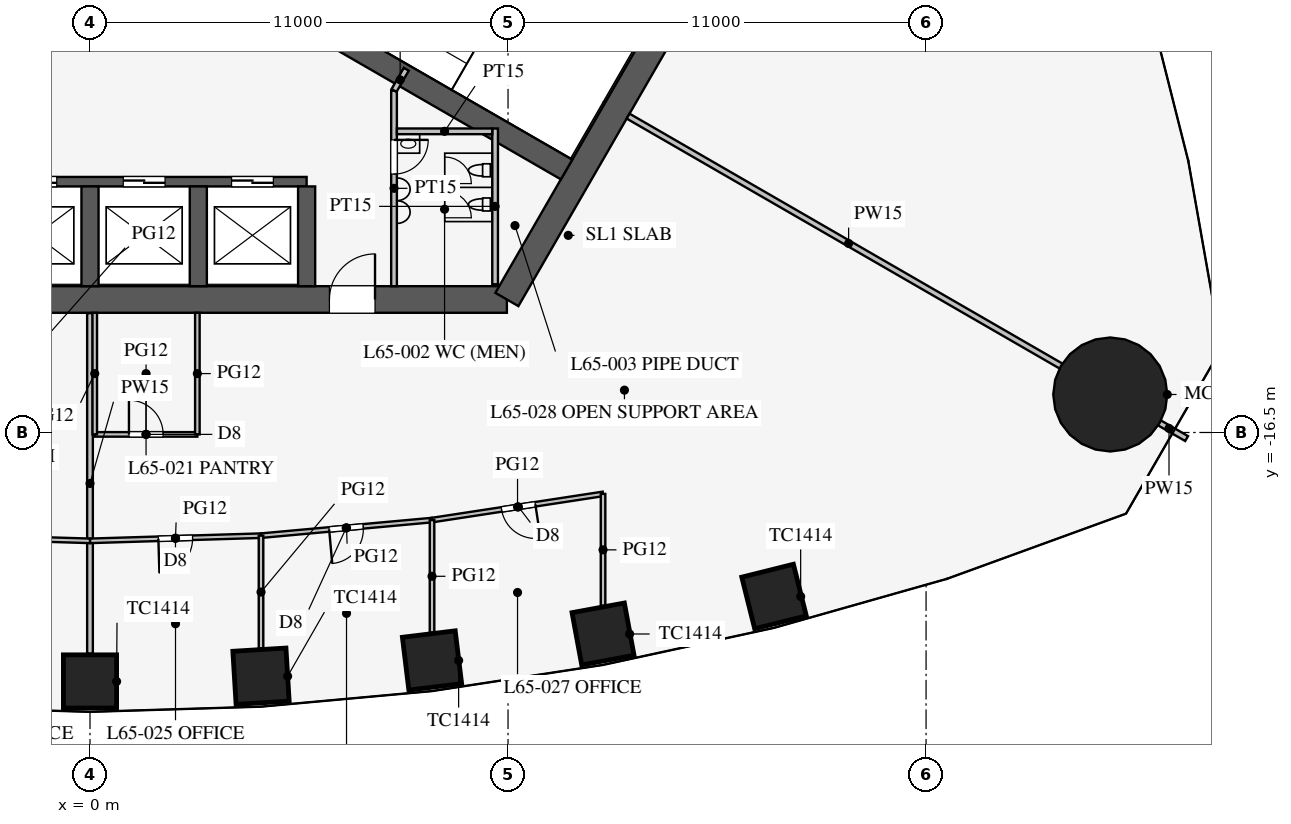
"""IFC4 building model, lengths in metres.
Left out: names, types, materials, properties, quantities, classifications, styles, units other than length and angle.
Written with IfcOpenShell. Run it as: python <this file> out.ifc"""

import sys

from ifc_helpers import new_model, si_unit, direction, frame, frame_2d, origin, origin_2d, place, context, subcontext, project, spatial, rectangle, circle, extrude, element, fill, save


model = new_model("IFC4")
c1 = context("Model", 3, precision=1e-05, world=origin(), true_north=direction((0.0, 1.0)))
c2 = subcontext(c1, "Body", "Model", "MODEL_VIEW")
j1 = project(units=[si_unit("LENGTHUNIT", "METRE"), si_unit("PLANEANGLEUNIT", "RADIAN")], contexts=[c1])
p1 = place(None, origin())
s1 = spatial("IfcSite", under=j1, at=p1, CompositionType="ELEMENT")
p2 = place(p1, origin())
s2 = spatial("IfcBuilding", under=s1, at=p2, CompositionType="ELEMENT")
p3 = place(p2, frame((0.0, 0.0, 284.7)))
s3 = spatial("IfcBuildingStorey", under=s2, at=p3, CompositionType="ELEMENT", Elevation=284.7)
for number, where, z_axis, x_axis in (
    (1, (0.0, -23.052, 0.0), (0.0, 0.0, 1.0), (1.0, 0.0, 0.0)),
    (2, (4.5, -22.914, 0.0), (0.0, 0.0, 1.0), (0.998, 0.061, 0.0)),
    (3, (9.0, -22.499, 0.0), (0.0, 0.0, 1.0), (0.993, 0.121, 0.0)),
    (4, (13.5, -21.803, 0.0), (0.0, 0.0, 1.0), (0.983, 0.182, 0.0)),
    (5, (18.0, -20.816, 0.0), (0.0, 0.0, 1.0), (0.97, 0.242, 0.0)),
):
    element("IfcColumn", number, at=place(p3, frame(where, z_axis=z_axis, x_axis=x_axis)), inside=s3, PredefinedType="COLUMN", context=c2, shape_type="SweptSolid", body=[
        extrude(rectangle(XDim=1.4, YDim=1.4, at=origin_2d()), origin(), (0.0, 0.0, 1.0), 4.2),
    ])
p4 = place(p3, frame((26.847, -15.5, 0.0), z_axis=(0.0, 0.0, 1.0), x_axis=(1.0, 0.0, 0.0)))
e6 = element("IfcColumn", 6, at=p4, inside=s3, PredefinedType="COLUMN", context=c2, shape_type="SweptSolid", body=[
    extrude(circle(Radius=1.5, at=origin_2d()), origin(), (0.0, 0.0, 1.0), 4.2),
])
p5 = place(p3, frame((-10.97, -13.0, 0.0), z_axis=(0.0, 0.0, 1.0), x_axis=(1.0, 0.0, 0.0)))
e7 = element("IfcWall", 7, at=p5, inside=s3, PredefinedType="SHEAR", context=c2, shape_type="SweptSolid", body=[
    extrude(rectangle(XDim=21.939, YDim=0.7, at=frame_2d((10.97, 0.0))), origin(), (0.0, 0.0, 1.0), 4.2),
])
p6 = place(p5, frame((17.27, 0.0, 0.0)))
e8 = element("IfcOpeningElement", 8, at=p6, cuts=e7, PredefinedType="OPENING", context=c2, shape_type="SweptSolid", body=[
    extrude(rectangle(XDim=1.2, YDim=2.1, at=frame_2d((0.6, 1.05))), frame((0.0, 0.36, 0.0), z_axis=(0.0, -1.0, 0.0), x_axis=(1.0, 0.0, 0.0)), (0.0, 0.0, 1.0), 0.72),
])
p7 = place(p5, frame((3.47, 0.0, 0.0)))
e9 = element("IfcOpeningElement", 9, at=p7, cuts=e7, PredefinedType="OPENING", context=c2, shape_type="SweptSolid", body=[
    extrude(rectangle(XDim=1.2, YDim=2.1, at=frame_2d((0.6, 1.05))), frame((0.0, 0.36, 0.0), z_axis=(0.0, -1.0, 0.0), x_axis=(1.0, 0.0, 0.0)), (0.0, 0.0, 1.0), 0.72),
])
p8 = place(p3, frame((10.97, -13.0, 0.0), z_axis=(0.0, 0.0, 1.0), x_axis=(0.499995765644, 0.866027848477, 0.0)))
e10 = element("IfcWall", 10, at=p8, inside=s3, PredefinedType="SHEAR", context=c2, shape_type="SweptSolid", body=[
    extrude(rectangle(XDim=11.547, YDim=0.7, at=frame_2d((5.773, 0.0))), origin(), (0.0, 0.0, 1.0), 4.2),
])
p9 = place(p3, frame((-5.7, -9.9, 0.0), z_axis=(0.0, 0.0, 1.0), x_axis=(1.0, 0.0, 0.0)))
e11 = element("IfcWall", 11, at=p9, inside=s3, PredefinedType="SHEAR", context=c2, shape_type="SweptSolid", body=[
    extrude(rectangle(XDim=11.4, YDim=0.25, at=frame_2d((5.7, 0.0))), origin(), (0.0, 0.0, 1.0), 4.2),
])
p10 = place(p9, frame((0.875, 0.0, 0.0)))
e12 = element("IfcOpeningElement", 12, at=p10, cuts=e11, PredefinedType="OPENING", context=c2, shape_type="SweptSolid", body=[
    extrude(rectangle(XDim=1.1, YDim=2.2, at=frame_2d((0.55, 1.1))), frame((0.0, 0.135, 0.0), z_axis=(0.0, -1.0, 0.0), x_axis=(1.0, 0.0, 0.0)), (0.0, 0.0, 1.0), 0.27),
])
p11 = place(p9, frame((3.725, 0.0, 0.0)))
e13 = element("IfcOpeningElement", 13, at=p11, cuts=e11, PredefinedType="OPENING", context=c2, shape_type="SweptSolid", body=[
    extrude(rectangle(XDim=1.1, YDim=2.2, at=frame_2d((0.55, 1.1))), frame((0.0, 0.135, 0.0), z_axis=(0.0, -1.0, 0.0), x_axis=(1.0, 0.0, 0.0)), (0.0, 0.0, 1.0), 0.27),
])
p12 = place(p9, frame((6.575, 0.0, 0.0)))
e14 = element("IfcOpeningElement", 14, at=p12, cuts=e11, PredefinedType="OPENING", context=c2, shape_type="SweptSolid", body=[
    extrude(rectangle(XDim=1.1, YDim=2.2, at=frame_2d((0.55, 1.1))), frame((0.0, 0.135, 0.0), z_axis=(0.0, -1.0, 0.0), x_axis=(1.0, 0.0, 0.0)), (0.0, 0.0, 1.0), 0.27),
])
p13 = place(p9, frame((9.425, 0.0, 0.0)))
e15 = element("IfcOpeningElement", 15, at=p13, cuts=e11, PredefinedType="OPENING", context=c2, shape_type="SweptSolid", body=[
    extrude(rectangle(XDim=1.1, YDim=2.2, at=frame_2d((0.55, 1.1))), frame((0.0, 0.135, 0.0), z_axis=(0.0, -1.0, 0.0), x_axis=(1.0, 0.0, 0.0)), (0.0, 0.0, 1.0), 0.27),
])
for number, where, z_axis, x_axis in (
    (16, (0.0, -10.025, 0.0), (0.0, 0.0, 1.0), (0.0, -1.0, 0.0)),
    (17, (2.85, -10.025, 0.0), (0.0, 0.0, 1.0), (0.0, -1.0, 0.0)),
    (18, (5.7, -10.025, 0.0), (0.0, 0.0, 1.0), (0.0, -1.0, 0.0)),
):
    element("IfcWall", number, at=place(p3, frame(where, z_axis=z_axis, x_axis=x_axis)), inside=s3, PredefinedType="SHEAR", context=c2, shape_type="SweptSolid", body=[
        extrude(rectangle(XDim=2.625, YDim=0.45, at=frame_2d((1.312, 0.0))), origin(), (0.0, 0.0, 1.0), 4.2),
    ])
p14 = place(p3, frame((4.638, -5.016, 0.0), z_axis=(0.0, 0.0, 1.0), x_axis=(0.866021621257, -0.500006551472, 0.0)))
e19 = element("IfcWall", 19, at=p14, inside=s3, PredefinedType="SHEAR", context=c2, shape_type="SweptSolid", body=[
    extrude(rectangle(XDim=9.125, YDim=0.6, at=frame_2d((4.562, 0.0))), origin(), (0.0, 0.0, 1.0), 4.2),
])
p15 = place(p3, frame((8.0, -7.5, 0.0), z_axis=(0.0, 0.0, 1.0), x_axis=(0.0, -1.0, 0.0)))
e20 = element("IfcWall", 20, at=p15, inside=s3, PredefinedType="PARTITIONING", context=c2, shape_type="SweptSolid", body=[
    extrude(rectangle(XDim=5.15, YDim=0.15, at=frame_2d((2.575, 0.0))), origin(), (0.0, 0.0, 1.0), 4.0),
])
p16 = place(p15, frame((1.3, 0.0, 0.0)))
e21 = element("IfcOpeningElement", 21, at=p16, cuts=e20, PredefinedType="OPENING", context=c2, shape_type="SweptSolid", body=[
    extrude(rectangle(XDim=0.9, YDim=2.1, at=frame_2d((0.45, 1.05))), frame((0.0, 0.085, 0.0), z_axis=(0.0, -1.0, 0.0), x_axis=(1.0, 0.0, 0.0)), (0.0, 0.0, 1.0), 0.17),
])
p17 = place(p3, frame((8.0, -7.5, 0.0), z_axis=(0.0, 0.0, 1.0), x_axis=(0.499842556608, 0.866116284689, 0.0)))
e22 = element("IfcWall", 22, at=p17, inside=s3, PredefinedType="PARTITIONING", context=c2, shape_type="SweptSolid", body=[
    extrude(rectangle(XDim=0.645, YDim=0.15, at=frame_2d((0.323, 0.0))), origin(), (0.0, 0.0, 1.0), 4.0),
])
p18 = place(p3, frame((10.66, -8.5, 0.0), z_axis=(0.0, 0.0, 1.0), x_axis=(0.0, -1.0, 0.0)))
e23 = element("IfcWall", 23, at=p18, inside=s3, PredefinedType="PARTITIONING", context=c2, shape_type="SweptSolid", body=[
    extrude(rectangle(XDim=4.1, YDim=0.15, at=frame_2d((2.05, 0.0))), origin(), (0.0, 0.0, 1.0), 4.0),
])
p19 = place(p3, frame((8.075, -8.575, 0.0), z_axis=(0.0, 0.0, 1.0), x_axis=(1.0, 0.0, 0.0)))
e24 = element("IfcWall", 24, at=p19, inside=s3, PredefinedType="PARTITIONING", context=c2, shape_type="SweptSolid", body=[
    extrude(rectangle(XDim=2.51, YDim=0.15, at=frame_2d((1.255, 0.0))), origin(), (0.0, 0.0, 1.0), 4.0),
])
p20 = place(p3, frame((14.159, -8.175, 0.0), z_axis=(0.0, 0.0, 1.0), x_axis=(0.866026905467, -0.499997399001, 0.0)))
e25 = element("IfcWall", 25, at=p20, inside=s3, PredefinedType="PARTITIONING", context=c2, shape_type="SweptSolid", body=[
    extrude(rectangle(XDim=13.4, YDim=0.15, at=frame_2d((6.7, 0.0))), origin(), (0.0, 0.0, 1.0), 2.5),
])
p21 = place(p3, frame((27.929, -16.125, 0.0), z_axis=(0.0, 0.0, 1.0), x_axis=(0.866086810508, -0.499893625349, 0.0)))
e26 = element("IfcWall", 26, at=p21, inside=s3, PredefinedType="PARTITIONING", context=c2, shape_type="SweptSolid", body=[
    extrude(rectangle(XDim=1.07, YDim=0.15, at=frame_2d((0.535, 0.0))), origin(), (0.0, 0.0, 1.0), 2.5),
])
p22 = place(p3, frame((0.0, -13.36, 0.0), z_axis=(0.0, 0.0, 1.0), x_axis=(0.0, -1.0, 0.0)))
e27 = element("IfcWall", 27, at=p22, inside=s3, PredefinedType="PARTITIONING", context=c2, shape_type="SweptSolid", body=[
    extrude(rectangle(XDim=8.961, YDim=0.15, at=frame_2d((4.481, 0.0))), origin(), (0.0, 0.0, 1.0), 3.0),
])
p23 = place(p3, frame((0.125, -16.55, 0.0), z_axis=(0.0, 0.0, 1.0), x_axis=(1.0, 0.0, 0.0)))
e28 = element("IfcWall", 28, at=p23, inside=s3, PredefinedType="PARTITIONING", context=c2, shape_type="SweptSolid", body=[
    extrude(rectangle(XDim=2.7, YDim=0.12, at=frame_2d((1.35, 0.0))), origin(), (0.0, 0.0, 1.0), 2.9),
])
p24 = place(p23, frame((0.9, 0.0, 0.15)))
e29 = element("IfcOpeningElement", 29, at=p24, cuts=e28, PredefinedType="OPENING", context=c2, shape_type="SweptSolid", body=[
    extrude(rectangle(XDim=0.9, YDim=2.1, at=frame_2d((0.45, 1.05))), frame((0.0, 0.07, 0.0), z_axis=(0.0, -1.0, 0.0), x_axis=(1.0, 0.0, 0.0)), (0.0, 0.0, 1.0), 0.14),
])
for number, where, z_axis, x_axis in (
    (30, (0.125, -13.35, 0.0), (0.0, 0.0, 1.0), (0.0, -1.0, 0.0)),
    (31, (2.825, -13.35, 0.0), (0.0, 0.0, 1.0), (0.0, -1.0, 0.0)),
):
    element("IfcWall", number, at=place(p3, frame(where, z_axis=z_axis, x_axis=x_axis)), inside=s3, PredefinedType="PARTITIONING", context=c2, shape_type="SweptSolid", body=[
        extrude(rectangle(XDim=3.2, YDim=0.12, at=frame_2d((1.6, 0.0))), origin(), (0.0, 0.0, 1.0), 2.9),
    ])
p25 = place(p3, frame((0.0, -19.352, 0.0), z_axis=(0.0, 0.0, 1.0), x_axis=(0.999542074227, 0.030259574513, 0.0)))
e32 = element("IfcWall", 32, at=p25, inside=s3, PredefinedType="PARTITIONING", context=c2, shape_type="SweptSolid", body=[
    extrude(rectangle(XDim=4.502, YDim=0.12, at=frame_2d((2.251, 0.0))), origin(), (0.0, 0.0, 1.0), 2.9),
])
p26 = place(p25, frame((1.8, 0.0, 0.15)))
e33 = element("IfcOpeningElement", 33, at=p26, cuts=e32, PredefinedType="OPENING", context=c2, shape_type="SweptSolid", body=[
    extrude(rectangle(XDim=0.9, YDim=2.1, at=frame_2d((0.45, 1.05))), frame((0.0, 0.07, 0.0), z_axis=(0.0, -1.0, 0.0), x_axis=(1.0, 0.0, 0.0)), (0.0, 0.0, 1.0), 0.14),
])
p27 = place(p3, frame((4.5, -19.215, 0.0), z_axis=(0.0, 0.0, 1.0), x_axis=(0.995871921504, 0.090769576179, 0.0)))
e34 = element("IfcWall", 34, at=p27, inside=s3, PredefinedType="PARTITIONING", context=c2, shape_type="SweptSolid", body=[
    extrude(rectangle(XDim=4.519, YDim=0.12, at=frame_2d((2.259, 0.0))), origin(), (0.0, 0.0, 1.0), 2.9),
])
p28 = place(p27, frame((1.8, 0.0, 0.15)))
e35 = element("IfcOpeningElement", 35, at=p28, cuts=e34, PredefinedType="OPENING", context=c2, shape_type="SweptSolid", body=[
    extrude(rectangle(XDim=0.9, YDim=2.1, at=frame_2d((0.45, 1.05))), frame((0.0, 0.07, 0.0), z_axis=(0.0, -1.0, 0.0), x_axis=(1.0, 0.0, 0.0)), (0.0, 0.0, 1.0), 0.14),
])
p29 = place(p3, frame((9.0, -18.805, 0.0), z_axis=(0.0, 0.0, 1.0), x_axis=(0.988481794406, 0.151339823341, 0.0)))
e36 = element("IfcWall", 36, at=p29, inside=s3, PredefinedType="PARTITIONING", context=c2, shape_type="SweptSolid", body=[
    extrude(rectangle(XDim=4.552, YDim=0.12, at=frame_2d((2.276, 0.0))), origin(), (0.0, 0.0, 1.0), 2.9),
])
p30 = place(p29, frame((1.85, 0.0, 0.15)))
e37 = element("IfcOpeningElement", 37, at=p30, cuts=e36, PredefinedType="OPENING", context=c2, shape_type="SweptSolid", body=[
    extrude(rectangle(XDim=0.9, YDim=2.1, at=frame_2d((0.45, 1.05))), frame((0.0, 0.07, 0.0), z_axis=(0.0, -1.0, 0.0), x_axis=(1.0, 0.0, 0.0)), (0.0, 0.0, 1.0), 0.14),
])
p31 = place(p3, frame((-4.5, -19.215, 0.0), z_axis=(0.0, 0.0, 1.0), x_axis=(0.999542074227, -0.030259574513, 0.0)))
e38 = element("IfcWall", 38, at=p31, inside=s3, PredefinedType="PARTITIONING", context=c2, shape_type="SweptSolid", body=[
    extrude(rectangle(XDim=4.502, YDim=0.12, at=frame_2d((2.251, 0.0))), origin(), (0.0, 0.0, 1.0), 2.9),
])
p32 = place(p31, frame((1.8, 0.0, 0.15)))
e39 = element("IfcOpeningElement", 39, at=p32, cuts=e38, PredefinedType="OPENING", context=c2, shape_type="SweptSolid", body=[
    extrude(rectangle(XDim=0.9, YDim=2.1, at=frame_2d((0.45, 1.05))), frame((0.0, 0.07, 0.0), z_axis=(0.0, -1.0, 0.0), x_axis=(1.0, 0.0, 0.0)), (0.0, 0.0, 1.0), 0.14),
])
p33 = place(p3, frame((13.5, -18.116, 0.0), z_axis=(0.0, 0.0, 1.0), x_axis=(0.0, -1.0, 0.0)))
e40 = element("IfcWall", 40, at=p33, inside=s3, PredefinedType="PARTITIONING", context=c2, shape_type="SweptSolid", body=[
    extrude(rectangle(XDim=2.944, YDim=0.12, at=frame_2d((1.472, 0.0))), origin(), (0.0, 0.0, 1.0), 2.8),
])
p34 = place(p3, frame((4.5, -19.215, 0.0), z_axis=(0.0, 0.0, 1.0), x_axis=(0.0, -1.0, 0.0)))
e41 = element("IfcWall", 41, at=p34, inside=s3, PredefinedType="PARTITIONING", context=c2, shape_type="SweptSolid", body=[
    extrude(rectangle(XDim=2.967, YDim=0.12, at=frame_2d((1.484, 0.0))), origin(), (0.0, 0.0, 1.0), 2.9),
])
p35 = place(p3, frame((9.0, -18.805, 0.0), z_axis=(0.0, 0.0, 1.0), x_axis=(0.0, -1.0, 0.0)))
e42 = element("IfcWall", 42, at=p35, inside=s3, PredefinedType="PARTITIONING", context=c2, shape_type="SweptSolid", body=[
    extrude(rectangle(XDim=2.959, YDim=0.12, at=frame_2d((1.479, 0.0))), origin(), (0.0, 0.0, 1.0), 2.9),
])
p36 = place(p3, frame((-0.49, 29.571, 0.0), z_axis=(0.0, 0.0, 1.0), x_axis=(-0.499999496503, -0.866025694478, 0.0)))
e43 = element("IfcWall", 43, at=p36, inside=s3, PredefinedType="PARTITIONING", context=c2, shape_type="SweptSolid", body=[
    extrude(rectangle(XDim=50.728, YDim=0.12, at=frame_2d((25.364, 0.0))), origin(), (0.0, 0.0, 1.0), 2.9),
])
p37 = place(p36, frame((9.8, 0.0, 0.15)))
e44 = element("IfcOpeningElement", 44, at=p37, cuts=e43, PredefinedType="OPENING", context=c2, shape_type="SweptSolid", body=[
    extrude(rectangle(XDim=1.8, YDim=2.1, at=frame_2d((0.9, 1.05))), frame((0.0, 0.07, 0.0), z_axis=(0.0, -1.0, 0.0), x_axis=(1.0, 0.0, 0.0)), (0.0, 0.0, 1.0), 0.14),
])
p38 = place(p36, frame((39.15, 0.0, 0.15)))
e45 = element("IfcOpeningElement", 45, at=p38, cuts=e43, PredefinedType="OPENING", context=c2, shape_type="SweptSolid", body=[
    extrude(rectangle(XDim=1.8, YDim=2.1, at=frame_2d((0.9, 1.05))), frame((0.0, 0.07, 0.0), z_axis=(0.0, -1.0, 0.0), x_axis=(1.0, 0.0, 0.0)), (0.0, 0.0, 1.0), 0.14),
])
p39 = place(p16, origin())
e46 = element("IfcDoor", 46, at=p39, inside=s3, OperationType="SINGLE_SWING_LEFT", PredefinedType="DOOR", context=c2, shape_type="SweptSolid", body=[
    extrude(rectangle(XDim=0.9, YDim=2.1, at=frame_2d((0.45, 1.05))), frame((0.0, 0.025, 0.0), z_axis=(0.0, -1.0, 0.0), x_axis=(1.0, 0.0, 0.0)), (0.0, 0.0, 1.0), 0.05),
])
fill(e21, e46)
p40 = place(p6, origin())
e47 = element("IfcDoor", 47, at=p40, inside=s3, OperationType="SINGLE_SWING_RIGHT", PredefinedType="DOOR", context=c2, shape_type="SweptSolid", body=[
    extrude(rectangle(XDim=1.2, YDim=2.1, at=frame_2d((0.6, 1.05))), frame((0.0, 0.025, 0.0), z_axis=(0.0, -1.0, 0.0), x_axis=(1.0, 0.0, 0.0)), (0.0, 0.0, 1.0), 0.05),
])
fill(e8, e47)
p41 = place(p24, origin())
e48 = element("IfcDoor", 48, at=p41, inside=s3, OperationType="SINGLE_SWING_LEFT", PredefinedType="DOOR", context=c2, shape_type="SweptSolid", body=[
    extrude(rectangle(XDim=0.9, YDim=2.1, at=frame_2d((0.45, 1.05))), frame((0.0, 0.025, 0.0), z_axis=(0.0, -1.0, 0.0), x_axis=(1.0, 0.0, 0.0)), (0.0, 0.0, 1.0), 0.05),
])
fill(e29, e48)
p42 = place(p26, frame((0.9, 0.0, 0.0), z_axis=(0.0, 0.0, 1.0), x_axis=(-1.0, 0.0, 0.0)))
e49 = element("IfcDoor", 49, at=p42, inside=s3, OperationType="SINGLE_SWING_RIGHT", PredefinedType="DOOR", context=c2, shape_type="SweptSolid", body=[
    extrude(rectangle(XDim=0.9, YDim=2.1, at=frame_2d((0.45, 1.05))), frame((0.0, 0.025, 0.0), z_axis=(0.0, -1.0, 0.0), x_axis=(1.0, 0.0, 0.0)), (0.0, 0.0, 1.0), 0.05),
])
fill(e33, e49)
p43 = place(p28, frame((0.9, 0.0, 0.0), z_axis=(0.0, 0.0, 1.0), x_axis=(-1.0, 0.0, 0.0)))
e50 = element("IfcDoor", 50, at=p43, inside=s3, OperationType="SINGLE_SWING_RIGHT", PredefinedType="DOOR", context=c2, shape_type="SweptSolid", body=[
    extrude(rectangle(XDim=0.9, YDim=2.1, at=frame_2d((0.45, 1.05))), frame((0.0, 0.025, 0.0), z_axis=(0.0, -1.0, 0.0), x_axis=(1.0, 0.0, 0.0)), (0.0, 0.0, 1.0), 0.05),
])
fill(e35, e50)
p44 = place(p30, frame((0.9, 0.0, 0.0), z_axis=(0.0, 0.0, 1.0), x_axis=(-1.0, 0.0, 0.0)))
e51 = element("IfcDoor", 51, at=p44, inside=s3, OperationType="SINGLE_SWING_LEFT", PredefinedType="DOOR", context=c2, shape_type="SweptSolid", body=[
    extrude(rectangle(XDim=0.9, YDim=2.1, at=frame_2d((0.45, 1.05))), frame((0.0, 0.025, 0.0), z_axis=(0.0, -1.0, 0.0), x_axis=(1.0, 0.0, 0.0)), (0.0, 0.0, 1.0), 0.05),
])
fill(e37, e51)
p45 = place(p11, origin())
e52 = element("IfcDoor", 52, at=p45, inside=s3, OperationType="DOUBLE_DOOR_SLIDING", PredefinedType="DOOR", context=c2, shape_type="SweptSolid", body=[
    extrude(rectangle(XDim=1.1, YDim=2.2, at=frame_2d((0.55, 1.1))), frame((0.0, 0.025, 0.0), z_axis=(0.0, -1.0, 0.0), x_axis=(1.0, 0.0, 0.0)), (0.0, 0.0, 1.0), 0.05),
])
fill(e13, e52)
p46 = place(p12, origin())
e53 = element("IfcDoor", 53, at=p46, inside=s3, OperationType="DOUBLE_DOOR_SLIDING", PredefinedType="DOOR", context=c2, shape_type="SweptSolid", body=[
    extrude(rectangle(XDim=1.1, YDim=2.2, at=frame_2d((0.55, 1.1))), frame((0.0, 0.025, 0.0), z_axis=(0.0, -1.0, 0.0), x_axis=(1.0, 0.0, 0.0)), (0.0, 0.0, 1.0), 0.05),
])
fill(e14, e53)
p47 = place(p13, origin())
e54 = element("IfcDoor", 54, at=p47, inside=s3, OperationType="DOUBLE_DOOR_SLIDING", PredefinedType="DOOR", context=c2, shape_type="SweptSolid", body=[
    extrude(rectangle(XDim=1.1, YDim=2.2, at=frame_2d((0.55, 1.1))), frame((0.0, 0.025, 0.0), z_axis=(0.0, -1.0, 0.0), x_axis=(1.0, 0.0, 0.0)), (0.0, 0.0, 1.0), 0.05),
])
fill(e15, e54)
save(model, sys.argv[1])
